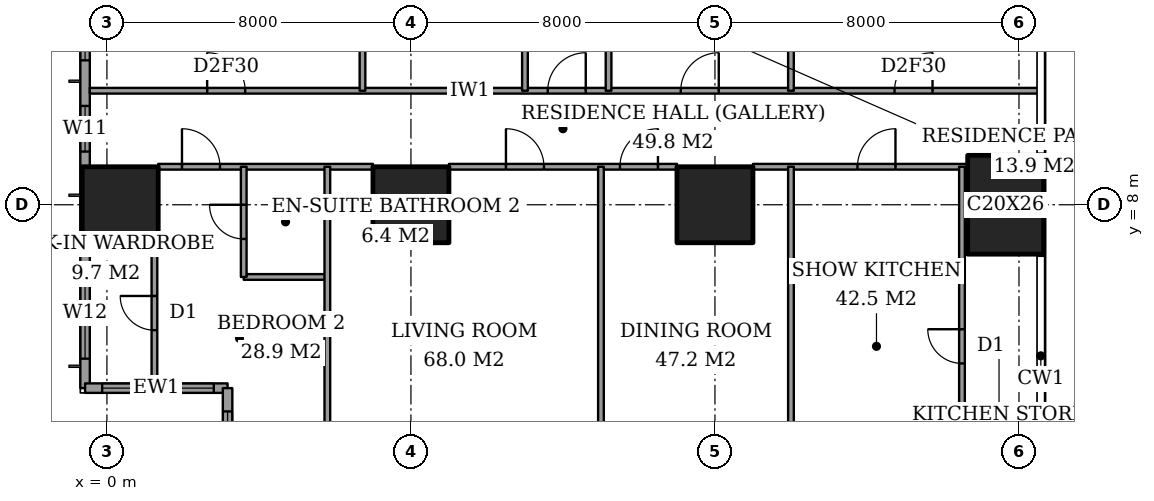
"""IFC4 building model, lengths in metres.
Left out: names, types, materials, properties, quantities, classifications, styles, units other than length and angle.
Written with IfcOpenShell. Run it as: python <this file> out.ifc"""

import sys

from ifc_helpers import new_model, si_unit, direction, frame, frame_2d, origin, origin_2d, place, context, subcontext, project, spatial, rectangle, extrude, element, fill, save


model = new_model("IFC4")
c1 = context("Model", 3, precision=1e-05, world=origin(), true_north=direction((0.0, 1.0)))
c2 = subcontext(c1, "Body", "Model", "MODEL_VIEW")
j1 = project(units=[si_unit("LENGTHUNIT", "METRE"), si_unit("PLANEANGLEUNIT", "RADIAN")], contexts=[c1])
p1 = place(None, origin())
s1 = spatial("IfcSite", under=j1, at=p1, CompositionType="ELEMENT")
p2 = place(p1, origin())
s2 = spatial("IfcBuilding", under=s1, at=p2, CompositionType="ELEMENT")
p3 = place(p2, frame((0.0, 0.0, 150.2)))
s3 = spatial("IfcBuildingStorey", under=s2, at=p3, CompositionType="ELEMENT", Elevation=150.2)
for number, where, z_axis, x_axis in (
    (1, (0.35, 8.0, 0.0), (0.0, 0.0, 1.0), (1.0, 0.0, 0.0)),
    (2, (8.0, 8.0, 0.0), (0.0, 0.0, 1.0), (1.0, 0.0, 0.0)),
    (3, (16.0, 8.0, 0.0), (0.0, 0.0, 1.0), (1.0, 0.0, 0.0)),
):
    element("IfcColumn", number, at=place(p3, frame(where, z_axis=z_axis, x_axis=x_axis)), inside=s3, PredefinedType="COLUMN", context=c2, shape_type="SweptSolid", body=[
        extrude(rectangle(XDim=2.0, YDim=2.0, at=origin_2d()), origin(), (0.0, 0.0, 1.0), 3.6),
    ])
p4 = place(p3, frame((23.65, 8.0, 0.0), z_axis=(0.0, 0.0, 1.0), x_axis=(1.0, 0.0, 0.0)))
e4 = element("IfcColumn", 4, at=p4, inside=s3, PredefinedType="COLUMN", context=c2, shape_type="SweptSolid", body=[
    extrude(rectangle(XDim=2.0, YDim=2.6, at=origin_2d()), origin(), (0.0, 0.0, 1.0), 3.6),
])
p5 = place(p3, frame((-0.575, 44.825, 0.0), z_axis=(0.0, 0.0, 1.0), x_axis=(0.0, -1.0, 0.0)))
e5 = element("IfcWall", 5, at=p5, inside=s3, PredefinedType="SOLIDWALL", context=c2, shape_type="SweptSolid", body=[
    extrude(rectangle(XDim=41.65, YDim=0.25, at=frame_2d((20.825, 0.0))), origin(), (0.0, 0.0, 1.0), 3.6),
])
p6 = place(p5, frame((0.775, 0.0, 0.4)))
e6 = element("IfcOpeningElement", 6, at=p6, cuts=e5, PredefinedType="OPENING", context=c2, shape_type="SweptSolid", body=[
    extrude(rectangle(XDim=2.4, YDim=2.2, at=frame_2d((1.2, 1.1))), frame((0.0, 0.135, 0.0), z_axis=(0.0, -1.0, 0.0), x_axis=(1.0, 0.0, 0.0)), (0.0, 0.0, 1.0), 0.27),
])
p7 = place(p5, frame((6.1, 0.0, 0.4)))
e7 = element("IfcOpeningElement", 7, at=p7, cuts=e5, PredefinedType="OPENING", context=c2, shape_type="SweptSolid", body=[
    extrude(rectangle(XDim=1.2, YDim=2.2, at=frame_2d((0.6, 1.1))), frame((0.0, 0.135, 0.0), z_axis=(0.0, -1.0, 0.0), x_axis=(1.0, 0.0, 0.0)), (0.0, 0.0, 1.0), 0.27),
])
p8 = place(p5, frame((8.425, 0.0, 0.4)))
e8 = element("IfcOpeningElement", 8, at=p8, cuts=e5, PredefinedType="OPENING", context=c2, shape_type="SweptSolid", body=[
    extrude(rectangle(XDim=2.4, YDim=2.2, at=frame_2d((1.2, 1.1))), frame((0.0, 0.135, 0.0), z_axis=(0.0, -1.0, 0.0), x_axis=(1.0, 0.0, 0.0)), (0.0, 0.0, 1.0), 0.27),
])
p9 = place(p5, frame((15.625, 0.0, 0.4)))
e9 = element("IfcOpeningElement", 9, at=p9, cuts=e5, PredefinedType="OPENING", context=c2, shape_type="SweptSolid", body=[
    extrude(rectangle(XDim=2.4, YDim=2.2, at=frame_2d((1.2, 1.1))), frame((0.0, 0.135, 0.0), z_axis=(0.0, -1.0, 0.0), x_axis=(1.0, 0.0, 0.0)), (0.0, 0.0, 1.0), 0.27),
])
p10 = place(p5, frame((23.625, 0.0, 0.4)))
e10 = element("IfcOpeningElement", 10, at=p10, cuts=e5, PredefinedType="OPENING", context=c2, shape_type="SweptSolid", body=[
    extrude(rectangle(XDim=2.4, YDim=2.2, at=frame_2d((1.2, 1.1))), frame((0.0, 0.135, 0.0), z_axis=(0.0, -1.0, 0.0), x_axis=(1.0, 0.0, 0.0)), (0.0, 0.0, 1.0), 0.27),
])
p11 = place(p5, frame((30.625, 0.0, 0.4)))
e11 = element("IfcOpeningElement", 11, at=p11, cuts=e5, PredefinedType="OPENING", context=c2, shape_type="SweptSolid", body=[
    extrude(rectangle(XDim=2.4, YDim=2.2, at=frame_2d((1.2, 1.1))), frame((0.0, 0.135, 0.0), z_axis=(0.0, -1.0, 0.0), x_axis=(1.0, 0.0, 0.0)), (0.0, 0.0, 1.0), 0.27),
])
p12 = place(p5, frame((34.225, 0.0, 0.4)))
e12 = element("IfcOpeningElement", 12, at=p12, cuts=e5, PredefinedType="OPENING", context=c2, shape_type="SweptSolid", body=[
    extrude(rectangle(XDim=1.2, YDim=2.2, at=frame_2d((0.6, 1.1))), frame((0.0, 0.135, 0.0), z_axis=(0.0, -1.0, 0.0), x_axis=(1.0, 0.0, 0.0)), (0.0, 0.0, 1.0), 0.27),
])
p13 = place(p5, frame((38.475, 0.0, 0.4)))
e13 = element("IfcOpeningElement", 13, at=p13, cuts=e5, PredefinedType="OPENING", context=c2, shape_type="SweptSolid", body=[
    extrude(rectangle(XDim=2.4, YDim=2.2, at=frame_2d((1.2, 1.1))), frame((0.0, 0.135, 0.0), z_axis=(0.0, -1.0, 0.0), x_axis=(1.0, 0.0, 0.0)), (0.0, 0.0, 1.0), 0.27),
])
p14 = place(p3, frame((-0.575, 3.175, 0.0), z_axis=(0.0, 0.0, 1.0), x_axis=(1.0, 0.0, 0.0)))
e14 = element("IfcWall", 14, at=p14, inside=s3, PredefinedType="SOLIDWALL", context=c2, shape_type="SweptSolid", body=[
    extrude(rectangle(XDim=3.75, YDim=0.25, at=frame_2d((1.875, 0.0))), origin(), (0.0, 0.0, 1.0), 3.6),
])
p15 = place(p14, frame((0.45, 0.0, 0.4)))
e15 = element("IfcOpeningElement", 15, at=p15, cuts=e14, PredefinedType="OPENING", context=c2, shape_type="SweptSolid", body=[
    extrude(rectangle(XDim=1.2, YDim=2.2, at=frame_2d((0.6, 1.1))), frame((0.0, 0.135, 0.0), z_axis=(0.0, -1.0, 0.0), x_axis=(1.0, 0.0, 0.0)), (0.0, 0.0, 1.0), 0.27),
])
p16 = place(p14, frame((2.188, 0.0, 0.4)))
e16 = element("IfcOpeningElement", 16, at=p16, cuts=e14, PredefinedType="OPENING", context=c2, shape_type="SweptSolid", body=[
    extrude(rectangle(XDim=1.2, YDim=2.2, at=frame_2d((0.6, 1.1))), frame((0.0, 0.135, 0.0), z_axis=(0.0, -1.0, 0.0), x_axis=(1.0, 0.0, 0.0)), (0.0, 0.0, 1.0), 0.27),
])
p17 = place(p3, frame((3.175, 3.175, 0.0), z_axis=(0.0, 0.0, 1.0), x_axis=(0.0, -1.0, 0.0)))
e17 = element("IfcWall", 17, at=p17, inside=s3, PredefinedType="SOLIDWALL", context=c2, shape_type="SweptSolid", body=[
    extrude(rectangle(XDim=3.75, YDim=0.25, at=frame_2d((1.875, 0.0))), origin(), (0.0, 0.0, 1.0), 3.6),
])
p18 = place(p17, frame((0.613, 0.0, 0.4)))
e18 = element("IfcOpeningElement", 18, at=p18, cuts=e17, PredefinedType="OPENING", context=c2, shape_type="SweptSolid", body=[
    extrude(rectangle(XDim=2.4, YDim=2.2, at=frame_2d((1.2, 1.1))), frame((0.0, 0.135, 0.0), z_axis=(0.0, -1.0, 0.0), x_axis=(1.0, 0.0, 0.0)), (0.0, 0.0, 1.0), 0.27),
])
p19 = place(p3, frame((3.6, 6.1, 0.0), z_axis=(0.0, 0.0, 1.0), x_axis=(1.0, 0.0, 0.0)))
e19 = element("IfcWall", 19, at=p19, inside=s3, PredefinedType="PARTITIONING", context=c2, shape_type="SweptSolid", body=[
    extrude(rectangle(XDim=2.2, YDim=0.15, at=frame_2d((1.1, 0.0))), origin(), (0.0, 0.0, 1.0), 3.35),
])
p20 = place(p3, frame((1.35, 9.0, 0.0), z_axis=(0.0, 0.0, 1.0), x_axis=(1.0, 0.0, 0.0)))
e20 = element("IfcWall", 20, at=p20, inside=s3, PredefinedType="PARTITIONING", context=c2, shape_type="SweptSolid", body=[
    extrude(rectangle(XDim=5.65, YDim=0.15, at=frame_2d((2.825, 0.0))), origin(), (0.0, 0.0, 1.0), 3.35),
])
p21 = place(p20, frame((0.625, 0.0, 0.0)))
e21 = element("IfcOpeningElement", 21, at=p21, cuts=e20, PredefinedType="OPENING", context=c2, shape_type="SweptSolid", body=[
    extrude(rectangle(XDim=1.0, YDim=2.1, at=frame_2d((0.5, 1.05))), frame((0.0, 0.085, 0.0), z_axis=(0.0, -1.0, 0.0), x_axis=(1.0, 0.0, 0.0)), (0.0, 0.0, 1.0), 0.17),
])
p22 = place(p3, frame((9.0, 9.0, 0.0), z_axis=(0.0, 0.0, 1.0), x_axis=(1.0, 0.0, 0.0)))
e22 = element("IfcWall", 22, at=p22, inside=s3, PredefinedType="PARTITIONING", context=c2, shape_type="SweptSolid", body=[
    extrude(rectangle(XDim=6.0, YDim=0.15, at=frame_2d((3.0, 0.0))), origin(), (0.0, 0.0, 1.0), 3.35),
])
p23 = place(p22, frame((1.5, 0.0, 0.0)))
e23 = element("IfcOpeningElement", 23, at=p23, cuts=e22, PredefinedType="OPENING", context=c2, shape_type="SweptSolid", body=[
    extrude(rectangle(XDim=1.0, YDim=2.1, at=frame_2d((0.5, 1.05))), frame((0.0, 0.085, 0.0), z_axis=(0.0, -1.0, 0.0), x_axis=(1.0, 0.0, 0.0)), (0.0, 0.0, 1.0), 0.17),
])
p24 = place(p22, frame((4.5, 0.0, 0.0)))
e24 = element("IfcOpeningElement", 24, at=p24, cuts=e22, PredefinedType="OPENING", context=c2, shape_type="SweptSolid", body=[
    extrude(rectangle(XDim=1.0, YDim=2.1, at=frame_2d((0.5, 1.05))), frame((0.0, 0.085, 0.0), z_axis=(0.0, -1.0, 0.0), x_axis=(1.0, 0.0, 0.0)), (0.0, 0.0, 1.0), 0.17),
])
p25 = place(p3, frame((17.0, 9.0, 0.0), z_axis=(0.0, 0.0, 1.0), x_axis=(1.0, 0.0, 0.0)))
e25 = element("IfcWall", 25, at=p25, inside=s3, PredefinedType="PARTITIONING", context=c2, shape_type="SweptSolid", body=[
    extrude(rectangle(XDim=5.65, YDim=0.15, at=frame_2d((2.825, 0.0))), origin(), (0.0, 0.0, 1.0), 3.35),
])
p26 = place(p25, frame((2.75, 0.0, 0.0)))
e26 = element("IfcOpeningElement", 26, at=p26, cuts=e25, PredefinedType="OPENING", context=c2, shape_type="SweptSolid", body=[
    extrude(rectangle(XDim=1.0, YDim=2.1, at=frame_2d((0.5, 1.05))), frame((0.0, 0.085, 0.0), z_axis=(0.0, -1.0, 0.0), x_axis=(1.0, 0.0, 0.0)), (0.0, 0.0, 1.0), 0.17),
])
p27 = place(p3, frame((-0.45, 11.0, 0.0), z_axis=(0.0, 0.0, 1.0), x_axis=(1.0, 0.0, 0.0)))
e27 = element("IfcWall", 27, at=p27, inside=s3, PredefinedType="PARTITIONING", context=c2, shape_type="SweptSolid", body=[
    extrude(rectangle(XDim=25.011, YDim=0.15, at=frame_2d((12.505, 0.0))), origin(), (0.0, 0.0, 1.0), 3.35),
])
p28 = place(p27, frame((12.05, 0.0, 0.0)))
e28 = element("IfcOpeningElement", 28, at=p28, cuts=e27, PredefinedType="OPENING", context=c2, shape_type="SweptSolid", body=[
    extrude(rectangle(XDim=1.0, YDim=2.1, at=frame_2d((0.5, 1.05))), frame((0.0, 0.085, 0.0), z_axis=(0.0, -1.0, 0.0), x_axis=(1.0, 0.0, 0.0)), (0.0, 0.0, 1.0), 0.17),
])
p29 = place(p27, frame((3.087, 0.0, 0.0)))
e29 = element("IfcOpeningElement", 29, at=p29, cuts=e27, PredefinedType="OPENING", context=c2, shape_type="SweptSolid", body=[
    extrude(rectangle(XDim=1.0, YDim=2.1, at=frame_2d((0.5, 1.05))), frame((0.0, 0.085, 0.0), z_axis=(0.0, -1.0, 0.0), x_axis=(1.0, 0.0, 0.0)), (0.0, 0.0, 1.0), 0.17),
])
p30 = place(p27, frame((15.55, 0.0, 0.0)))
e30 = element("IfcOpeningElement", 30, at=p30, cuts=e27, PredefinedType="OPENING", context=c2, shape_type="SweptSolid", body=[
    extrude(rectangle(XDim=1.0, YDim=2.1, at=frame_2d((0.5, 1.05))), frame((0.0, 0.085, 0.0), z_axis=(0.0, -1.0, 0.0), x_axis=(1.0, 0.0, 0.0)), (0.0, 0.0, 1.0), 0.17),
])
p31 = place(p27, frame((21.175, 0.0, 0.0)))
e31 = element("IfcOpeningElement", 31, at=p31, cuts=e27, PredefinedType="OPENING", context=c2, shape_type="SweptSolid", body=[
    extrude(rectangle(XDim=1.0, YDim=2.1, at=frame_2d((0.5, 1.05))), frame((0.0, 0.085, 0.0), z_axis=(0.0, -1.0, 0.0), x_axis=(1.0, 0.0, 0.0)), (0.0, 0.0, 1.0), 0.17),
])
p32 = place(p3, frame((1.25, 3.3, 0.0), z_axis=(0.0, 0.0, 1.0), x_axis=(0.0, 1.0, 0.0)))
e32 = element("IfcWall", 32, at=p32, inside=s3, PredefinedType="PARTITIONING", context=c2, shape_type="SweptSolid", body=[
    extrude(rectangle(XDim=3.7, YDim=0.15, at=frame_2d((1.85, 0.0))), origin(), (0.0, 0.0, 1.0), 3.35),
])
p33 = place(p32, frame((1.4, 0.0, 0.0)))
e33 = element("IfcOpeningElement", 33, at=p33, cuts=e32, PredefinedType="OPENING", context=c2, shape_type="SweptSolid", body=[
    extrude(rectangle(XDim=0.9, YDim=2.1, at=frame_2d((0.45, 1.05))), frame((0.0, 0.085, 0.0), z_axis=(0.0, -1.0, 0.0), x_axis=(1.0, 0.0, 0.0)), (0.0, 0.0, 1.0), 0.17),
])
p34 = place(p3, frame((3.6, 6.1, 0.0), z_axis=(0.0, 0.0, 1.0), x_axis=(0.0, 1.0, 0.0)))
e34 = element("IfcWall", 34, at=p34, inside=s3, PredefinedType="PARTITIONING", context=c2, shape_type="SweptSolid", body=[
    extrude(rectangle(XDim=2.9, YDim=0.15, at=frame_2d((1.45, 0.0))), origin(), (0.0, 0.0, 1.0), 3.35),
])
p35 = place(p34, frame((1.0, 0.0, 0.0)))
e35 = element("IfcOpeningElement", 35, at=p35, cuts=e34, PredefinedType="OPENING", context=c2, shape_type="SweptSolid", body=[
    extrude(rectangle(XDim=0.9, YDim=2.1, at=frame_2d((0.45, 1.05))), frame((0.0, 0.085, 0.0), z_axis=(0.0, -1.0, 0.0), x_axis=(1.0, 0.0, 0.0)), (0.0, 0.0, 1.0), 0.17),
])
p36 = place(p3, frame((5.8, -0.45, 0.0), z_axis=(0.0, 0.0, 1.0), x_axis=(0.0, 1.0, 0.0)))
e36 = element("IfcWall", 36, at=p36, inside=s3, PredefinedType="PARTITIONING", context=c2, shape_type="SweptSolid", body=[
    extrude(rectangle(XDim=9.45, YDim=0.15, at=frame_2d((4.725, 0.0))), origin(), (0.0, 0.0, 1.0), 3.35),
])
p37 = place(p3, frame((6.725, 11.0, 0.0), z_axis=(0.0, 0.0, 1.0), x_axis=(0.0, 1.0, 0.0)))
e37 = element("IfcWall", 37, at=p37, inside=s3, PredefinedType="PARTITIONING", context=c2, shape_type="SweptSolid", body=[
    extrude(rectangle(XDim=3.8, YDim=0.15, at=frame_2d((1.9, 0.0))), origin(), (0.0, 0.0, 1.0), 3.35),
])
p38 = place(p37, frame((1.15, 0.0, 0.0)))
e38 = element("IfcOpeningElement", 38, at=p38, cuts=e37, PredefinedType="OPENING", context=c2, shape_type="SweptSolid", body=[
    extrude(rectangle(XDim=0.9, YDim=2.1, at=frame_2d((0.45, 1.05))), frame((0.0, 0.085, 0.0), z_axis=(0.0, -1.0, 0.0), x_axis=(1.0, 0.0, 0.0)), (0.0, 0.0, 1.0), 0.17),
])
p39 = place(p3, frame((11.0, 11.0, 0.0), z_axis=(0.0, 0.0, 1.0), x_axis=(0.0, 1.0, 0.0)))
e39 = element("IfcWall", 39, at=p39, inside=s3, PredefinedType="PARTITIONING", context=c2, shape_type="SweptSolid", body=[
    extrude(rectangle(XDim=10.6, YDim=0.15, at=frame_2d((5.3, 0.0))), origin(), (0.0, 0.0, 1.0), 3.35),
])
p40 = place(p39, frame((7.962, 0.0, 0.0)))
e40 = element("IfcOpeningElement", 40, at=p40, cuts=e39, PredefinedType="OPENING", context=c2, shape_type="SweptSolid", body=[
    extrude(rectangle(XDim=1.0, YDim=2.1, at=frame_2d((0.5, 1.05))), frame((0.0, 0.085, 0.0), z_axis=(0.0, -1.0, 0.0), x_axis=(1.0, 0.0, 0.0)), (0.0, 0.0, 1.0), 0.17),
])
p41 = place(p3, frame((13.0, -0.45, 0.0), z_axis=(0.0, 0.0, 1.0), x_axis=(0.0, 1.0, 0.0)))
e41 = element("IfcWall", 41, at=p41, inside=s3, PredefinedType="PARTITIONING", context=c2, shape_type="SweptSolid", body=[
    extrude(rectangle(XDim=9.45, YDim=0.15, at=frame_2d((4.725, 0.0))), origin(), (0.0, 0.0, 1.0), 3.35),
])
p42 = place(p3, frame((13.2, 11.0, 0.0), z_axis=(0.0, 0.0, 1.0), x_axis=(0.0, 1.0, 0.0)))
e42 = element("IfcWall", 42, at=p42, inside=s3, PredefinedType="PARTITIONING", context=c2, shape_type="SweptSolid", body=[
    extrude(rectangle(XDim=6.325, YDim=0.15, at=frame_2d((3.163, 0.0))), origin(), (0.0, 0.0, 1.0), 3.35),
])
p43 = place(p3, frame((18.0, -0.45, 0.0), z_axis=(0.0, 0.0, 1.0), x_axis=(0.0, 1.0, 0.0)))
e43 = element("IfcWall", 43, at=p43, inside=s3, PredefinedType="PARTITIONING", context=c2, shape_type="SweptSolid", body=[
    extrude(rectangle(XDim=9.45, YDim=0.15, at=frame_2d((4.725, 0.0))), origin(), (0.0, 0.0, 1.0), 3.35),
])
p44 = place(p3, frame((18.0, 11.0, 0.0), z_axis=(0.0, 0.0, 1.0), x_axis=(0.0, 1.0, 0.0)))
e44 = element("IfcWall", 44, at=p44, inside=s3, PredefinedType="PARTITIONING", context=c2, shape_type="SweptSolid", body=[
    extrude(rectangle(XDim=6.325, YDim=0.15, at=frame_2d((3.163, 0.0))), origin(), (0.0, 0.0, 1.0), 3.35),
])
p45 = place(p3, frame((22.5, -0.45, 0.0), z_axis=(0.0, 0.0, 1.0), x_axis=(0.0, 1.0, 0.0)))
e45 = element("IfcWall", 45, at=p45, inside=s3, PredefinedType="PARTITIONING", context=c2, shape_type="SweptSolid", body=[
    extrude(rectangle(XDim=9.45, YDim=0.15, at=frame_2d((4.725, 0.0))), origin(), (0.0, 0.0, 1.0), 3.35),
])
p46 = place(p45, frame((4.275, 0.0, 0.0)))
e46 = element("IfcOpeningElement", 46, at=p46, cuts=e45, PredefinedType="OPENING", context=c2, shape_type="SweptSolid", body=[
    extrude(rectangle(XDim=0.9, YDim=2.1, at=frame_2d((0.45, 1.05))), frame((0.0, 0.085, 0.0), z_axis=(0.0, -1.0, 0.0), x_axis=(1.0, 0.0, 0.0)), (0.0, 0.0, 1.0), 0.17),
])
p47 = place(p11, origin())
e47 = element("IfcWindow", 47, at=p47, inside=s3, PartitioningType="SINGLE_PANEL", PredefinedType="WINDOW", context=c2, shape_type="SweptSolid", body=[
    extrude(rectangle(XDim=2.4, YDim=2.2, at=frame_2d((1.2, 1.1))), frame((0.0, 0.03, 0.0), z_axis=(0.0, -1.0, 0.0), x_axis=(1.0, 0.0, 0.0)), (0.0, 0.0, 1.0), 0.06),
])
fill(e11, e47)
p48 = place(p12, origin())
e48 = element("IfcWindow", 48, at=p48, inside=s3, PartitioningType="SINGLE_PANEL", PredefinedType="WINDOW", context=c2, shape_type="SweptSolid", body=[
    extrude(rectangle(XDim=1.2, YDim=2.2, at=frame_2d((0.6, 1.1))), frame((0.0, 0.03, 0.0), z_axis=(0.0, -1.0, 0.0), x_axis=(1.0, 0.0, 0.0)), (0.0, 0.0, 1.0), 0.06),
])
fill(e12, e48)
p49 = place(p13, origin())
e49 = element("IfcWindow", 49, at=p49, inside=s3, PartitioningType="SINGLE_PANEL", PredefinedType="WINDOW", context=c2, shape_type="SweptSolid", body=[
    extrude(rectangle(XDim=2.4, YDim=2.2, at=frame_2d((1.2, 1.1))), frame((0.0, 0.03, 0.0), z_axis=(0.0, -1.0, 0.0), x_axis=(1.0, 0.0, 0.0)), (0.0, 0.0, 1.0), 0.06),
])
fill(e13, e49)
p50 = place(p15, origin())
e50 = element("IfcWindow", 50, at=p50, inside=s3, PartitioningType="SINGLE_PANEL", PredefinedType="WINDOW", context=c2, shape_type="SweptSolid", body=[
    extrude(rectangle(XDim=1.2, YDim=2.2, at=frame_2d((0.6, 1.1))), frame((0.0, 0.03, 0.0), z_axis=(0.0, -1.0, 0.0), x_axis=(1.0, 0.0, 0.0)), (0.0, 0.0, 1.0), 0.06),
])
fill(e15, e50)
p51 = place(p16, origin())
e51 = element("IfcWindow", 51, at=p51, inside=s3, PartitioningType="SINGLE_PANEL", PredefinedType="WINDOW", context=c2, shape_type="SweptSolid", body=[
    extrude(rectangle(XDim=1.2, YDim=2.2, at=frame_2d((0.6, 1.1))), frame((0.0, 0.03, 0.0), z_axis=(0.0, -1.0, 0.0), x_axis=(1.0, 0.0, 0.0)), (0.0, 0.0, 1.0), 0.06),
])
fill(e16, e51)
p52 = place(p18, origin())
e52 = element("IfcWindow", 52, at=p52, inside=s3, PartitioningType="SINGLE_PANEL", PredefinedType="WINDOW", context=c2, shape_type="SweptSolid", body=[
    extrude(rectangle(XDim=2.4, YDim=2.2, at=frame_2d((1.2, 1.1))), frame((0.0, 0.03, 0.0), z_axis=(0.0, -1.0, 0.0), x_axis=(1.0, 0.0, 0.0)), (0.0, 0.0, 1.0), 0.06),
])
fill(e18, e52)
p53 = place(p33, origin())
e53 = element("IfcDoor", 53, at=p53, inside=s3, OperationType="SINGLE_SWING_LEFT", PredefinedType="DOOR", context=c2, shape_type="SweptSolid", body=[
    extrude(rectangle(XDim=0.9, YDim=2.1, at=frame_2d((0.45, 1.05))), frame((0.0, 0.025, 0.0), z_axis=(0.0, -1.0, 0.0), x_axis=(1.0, 0.0, 0.0)), (0.0, 0.0, 1.0), 0.05),
])
fill(e33, e53)
p54 = place(p35, origin())
e54 = element("IfcDoor", 54, at=p54, inside=s3, OperationType="SINGLE_SWING_LEFT", PredefinedType="DOOR", context=c2, shape_type="SweptSolid", body=[
    extrude(rectangle(XDim=0.9, YDim=2.1, at=frame_2d((0.45, 1.05))), frame((0.0, 0.025, 0.0), z_axis=(0.0, -1.0, 0.0), x_axis=(1.0, 0.0, 0.0)), (0.0, 0.0, 1.0), 0.05),
])
fill(e35, e54)
p55 = place(p21, origin())
e55 = element("IfcDoor", 55, at=p55, inside=s3, OperationType="SINGLE_SWING_RIGHT", PredefinedType="DOOR", context=c2, shape_type="SweptSolid", body=[
    extrude(rectangle(XDim=1.0, YDim=2.1, at=frame_2d((0.5, 1.05))), frame((0.0, 0.025, 0.0), z_axis=(0.0, -1.0, 0.0), x_axis=(1.0, 0.0, 0.0)), (0.0, 0.0, 1.0), 0.05),
])
fill(e21, e55)
p56 = place(p23, origin())
e56 = element("IfcDoor", 56, at=p56, inside=s3, OperationType="SINGLE_SWING_RIGHT", PredefinedType="DOOR", context=c2, shape_type="SweptSolid", body=[
    extrude(rectangle(XDim=1.0, YDim=2.1, at=frame_2d((0.5, 1.05))), frame((0.0, 0.025, 0.0), z_axis=(0.0, -1.0, 0.0), x_axis=(1.0, 0.0, 0.0)), (0.0, 0.0, 1.0), 0.05),
])
fill(e23, e56)
p57 = place(p24, origin())
e57 = element("IfcDoor", 57, at=p57, inside=s3, OperationType="SINGLE_SWING_LEFT", PredefinedType="DOOR", context=c2, shape_type="SweptSolid", body=[
    extrude(rectangle(XDim=1.0, YDim=2.1, at=frame_2d((0.5, 1.05))), frame((0.0, 0.025, 0.0), z_axis=(0.0, -1.0, 0.0), x_axis=(1.0, 0.0, 0.0)), (0.0, 0.0, 1.0), 0.05),
])
fill(e24, e57)
p58 = place(p26, origin())
e58 = element("IfcDoor", 58, at=p58, inside=s3, OperationType="SINGLE_SWING_LEFT", PredefinedType="DOOR", context=c2, shape_type="SweptSolid", body=[
    extrude(rectangle(XDim=1.0, YDim=2.1, at=frame_2d((0.5, 1.05))), frame((0.0, 0.025, 0.0), z_axis=(0.0, -1.0, 0.0), x_axis=(1.0, 0.0, 0.0)), (0.0, 0.0, 1.0), 0.05),
])
fill(e26, e58)
p59 = place(p46, origin())
e59 = element("IfcDoor", 59, at=p59, inside=s3, OperationType="SINGLE_SWING_LEFT", PredefinedType="DOOR", context=c2, shape_type="SweptSolid", body=[
    extrude(rectangle(XDim=0.9, YDim=2.1, at=frame_2d((0.45, 1.05))), frame((0.0, 0.025, 0.0), z_axis=(0.0, -1.0, 0.0), x_axis=(1.0, 0.0, 0.0)), (0.0, 0.0, 1.0), 0.05),
])
fill(e46, e59)
p60 = place(p28, origin())
e60 = element("IfcDoor", 60, at=p60, inside=s3, OperationType="SINGLE_SWING_LEFT", PredefinedType="DOOR", context=c2, shape_type="SweptSolid", body=[
    extrude(rectangle(XDim=1.0, YDim=2.1, at=frame_2d((0.5, 1.05))), frame((0.0, 0.025, 0.0), z_axis=(0.0, -1.0, 0.0), x_axis=(1.0, 0.0, 0.0)), (0.0, 0.0, 1.0), 0.05),
])
fill(e28, e60)
p61 = place(p29, origin())
e61 = element("IfcDoor", 61, at=p61, inside=s3, OperationType="SINGLE_SWING_RIGHT", PredefinedType="DOOR", context=c2, shape_type="SweptSolid", body=[
    extrude(rectangle(XDim=1.0, YDim=2.1, at=frame_2d((0.5, 1.05))), frame((0.0, 0.025, 0.0), z_axis=(0.0, -1.0, 0.0), x_axis=(1.0, 0.0, 0.0)), (0.0, 0.0, 1.0), 0.05),
])
fill(e29, e61)
p62 = place(p30, origin())
e62 = element("IfcDoor", 62, at=p62, inside=s3, OperationType="SINGLE_SWING_LEFT", PredefinedType="DOOR", context=c2, shape_type="SweptSolid", body=[
    extrude(rectangle(XDim=1.0, YDim=2.1, at=frame_2d((0.5, 1.05))), frame((0.0, 0.025, 0.0), z_axis=(0.0, -1.0, 0.0), x_axis=(1.0, 0.0, 0.0)), (0.0, 0.0, 1.0), 0.05),
])
fill(e30, e62)
p63 = place(p31, origin())
e63 = element("IfcDoor", 63, at=p63, inside=s3, OperationType="SINGLE_SWING_LEFT", PredefinedType="DOOR", context=c2, shape_type="SweptSolid", body=[
    extrude(rectangle(XDim=1.0, YDim=2.1, at=frame_2d((0.5, 1.05))), frame((0.0, 0.025, 0.0), z_axis=(0.0, -1.0, 0.0), x_axis=(1.0, 0.0, 0.0)), (0.0, 0.0, 1.0), 0.05),
])
fill(e31, e63)
save(model, sys.argv[1])
